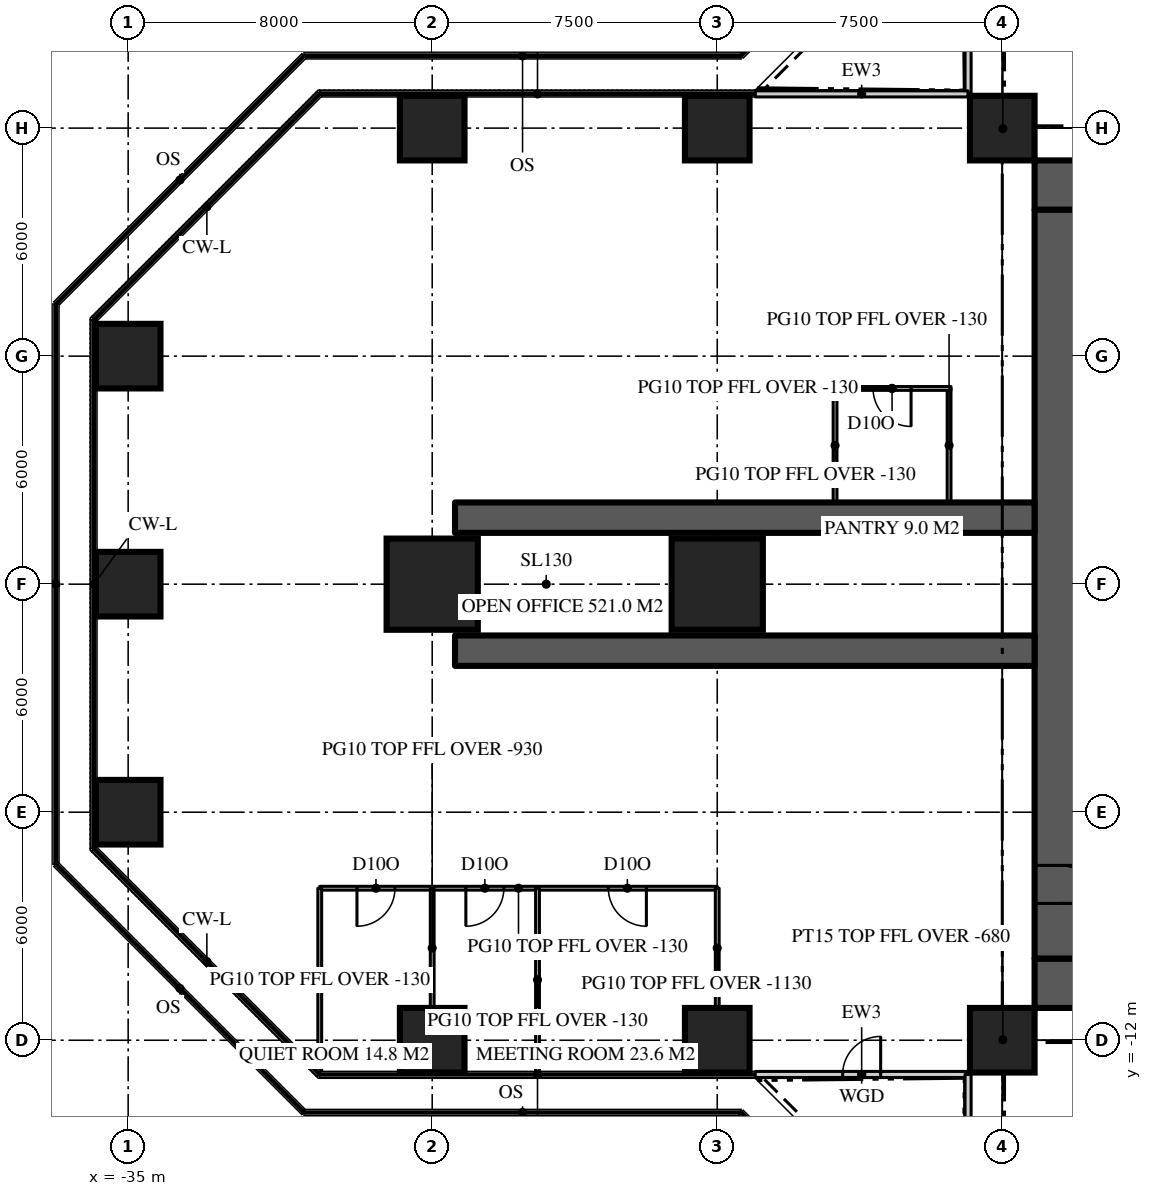
"""IFC4 building model, lengths in metres.
Left out: names, types, materials, properties, quantities, classifications, styles, units other than length and angle.
Written with IfcOpenShell. Run it as: python <this file> out.ifc"""

import sys

from ifc_helpers import new_model, si_unit, direction, frame, frame_2d, origin, origin_2d, place, context, subcontext, project, spatial, rectangle, extrude, element, fill, save


model = new_model("IFC4")
c1 = context("Model", 3, precision=1e-05, world=origin(), true_north=direction((0.0, 1.0)))
c2 = subcontext(c1, "Body", "Model", "MODEL_VIEW")
j1 = project(units=[si_unit("LENGTHUNIT", "METRE"), si_unit("PLANEANGLEUNIT", "RADIAN")], contexts=[c1])
p1 = place(None, origin())
s1 = spatial("IfcSite", under=j1, at=p1, CompositionType="ELEMENT")
p2 = place(p1, origin())
s2 = spatial("IfcBuilding", under=s1, at=p2, CompositionType="ELEMENT")
p3 = place(p2, frame((0.0, 0.0, 74.7)))
s3 = spatial("IfcBuildingStorey", under=s2, at=p3, CompositionType="ELEMENT", Elevation=74.7)
p4 = place(p3, frame((-11.15, 10.5, 0.0), z_axis=(0.0, 0.0, 1.0), x_axis=(1.0, 0.0, 0.0)))
e1 = element("IfcWall", 1, at=p4, inside=s3, PredefinedType="SHEAR", context=c2, shape_type="SweptSolid", body=[
    extrude(rectangle(XDim=22.3, YDim=1.3, at=frame_2d((11.15, 0.0))), origin(), (0.0, 0.0, 1.0), 3.9),
])
p5 = place(p4, frame((4.25, 0.0, 0.0)))
e2 = element("IfcOpeningElement", 2, at=p5, cuts=e1, PredefinedType="OPENING", context=c2, shape_type="SweptSolid", body=[
    extrude(rectangle(XDim=1.8, YDim=2.2, at=frame_2d((0.9, 1.1))), frame((0.0, 0.66, 0.0), z_axis=(0.0, -1.0, 0.0), x_axis=(1.0, 0.0, 0.0)), (0.0, 0.0, 1.0), 1.32),
])
p6 = place(p4, frame((16.25, 0.0, 0.0)))
e3 = element("IfcOpeningElement", 3, at=p6, cuts=e1, PredefinedType="OPENING", context=c2, shape_type="SweptSolid", body=[
    extrude(rectangle(XDim=1.8, YDim=2.2, at=frame_2d((0.9, 1.1))), frame((0.0, 0.66, 0.0), z_axis=(0.0, -1.0, 0.0), x_axis=(1.0, 0.0, 0.0)), (0.0, 0.0, 1.0), 1.32),
])
p7 = place(p3, frame((11.15, -10.5, 0.0), z_axis=(0.0, 0.0, 1.0), x_axis=(-1.0, 0.0, 0.0)))
e4 = element("IfcWall", 4, at=p7, inside=s3, PredefinedType="SHEAR", context=c2, shape_type="SweptSolid", body=[
    extrude(rectangle(XDim=22.3, YDim=1.3, at=frame_2d((11.15, 0.0))), origin(), (0.0, 0.0, 1.0), 3.9),
])
p8 = place(p7, frame((16.25, 0.0, 0.0)))
e5 = element("IfcOpeningElement", 5, at=p8, cuts=e4, PredefinedType="OPENING", context=c2, shape_type="SweptSolid", body=[
    extrude(rectangle(XDim=1.8, YDim=2.2, at=frame_2d((0.9, 1.1))), frame((0.0, 0.66, 0.0), z_axis=(0.0, -1.0, 0.0), x_axis=(1.0, 0.0, 0.0)), (0.0, 0.0, 1.0), 1.32),
])
p9 = place(p7, frame((4.25, 0.0, 0.0)))
e6 = element("IfcOpeningElement", 6, at=p9, cuts=e4, PredefinedType="OPENING", context=c2, shape_type="SweptSolid", body=[
    extrude(rectangle(XDim=1.8, YDim=2.2, at=frame_2d((0.9, 1.1))), frame((0.0, 0.66, 0.0), z_axis=(0.0, -1.0, 0.0), x_axis=(1.0, 0.0, 0.0)), (0.0, 0.0, 1.0), 1.32),
])
p10 = place(p3, frame((-10.5, 9.85, 0.0), z_axis=(0.0, 0.0, 1.0), x_axis=(0.0, -1.0, 0.0)))
e7 = element("IfcWall", 7, at=p10, inside=s3, PredefinedType="SHEAR", context=c2, shape_type="SweptSolid", body=[
    extrude(rectangle(XDim=19.7, YDim=1.3, at=frame_2d((9.85, 0.0))), origin(), (0.0, 0.0, 1.0), 3.9),
])
p11 = place(p10, frame((17.25, 0.0, 0.0)))
e8 = element("IfcOpeningElement", 8, at=p11, cuts=e7, PredefinedType="OPENING", context=c2, shape_type="SweptSolid", body=[
    extrude(rectangle(XDim=1.0, YDim=2.2, at=frame_2d((0.5, 1.1))), frame((0.0, 0.66, 0.0), z_axis=(0.0, -1.0, 0.0), x_axis=(1.0, 0.0, 0.0)), (0.0, 0.0, 1.0), 1.32),
])
for number, where, z_axis, x_axis in (
    (9, (-11.15, 1.75, 0.0), (0.0, 0.0, 1.0), (-1.0, 0.0, 0.0)),
    (10, (-11.15, -1.75, 0.0), (0.0, 0.0, 1.0), (-1.0, 0.0, 0.0)),
):
    element("IfcWall", number, at=place(p3, frame(where, z_axis=z_axis, x_axis=x_axis)), inside=s3, PredefinedType="SHEAR", context=c2, shape_type="SweptSolid", body=[
        extrude(rectangle(XDim=15.25, YDim=0.8, at=frame_2d((7.625, 0.0))), origin(), (0.0, 0.0, 1.0), 3.9),
    ])
for number, where, z_axis, x_axis in (
    (11, (-27.0, -12.0, 0.0), (0.0, 0.0, 1.0), (1.0, 0.0, 0.0)),
    (12, (-19.5, -12.0, 0.0), (0.0, 0.0, 1.0), (1.0, 0.0, 0.0)),
    (13, (-12.0, -12.0, 0.0), (0.0, 0.0, 1.0), (1.0, 0.0, 0.0)),
    (14, (-35.0, -6.0, 0.0), (0.0, 0.0, 1.0), (1.0, 0.0, 0.0)),
    (15, (-35.0, 0.0, 0.0), (0.0, 0.0, 1.0), (1.0, 0.0, 0.0)),
):
    element("IfcColumn", number, at=place(p3, frame(where, z_axis=z_axis, x_axis=x_axis)), inside=s3, PredefinedType="COLUMN", context=c2, shape_type="SweptSolid", body=[
        extrude(rectangle(XDim=1.7, YDim=1.7, at=origin_2d()), origin(), (0.0, 0.0, 1.0), 3.9),
    ])
for number, where, z_axis, x_axis in (
    (16, (-27.0, 0.0, 0.0), (0.0, 0.0, 1.0), (1.0, 0.0, 0.0)),
    (17, (-19.5, 0.0, 0.0), (0.0, 0.0, 1.0), (1.0, 0.0, 0.0)),
):
    element("IfcColumn", number, at=place(p3, frame(where, z_axis=z_axis, x_axis=x_axis)), inside=s3, PredefinedType="COLUMN", context=c2, shape_type="SweptSolid", body=[
        extrude(rectangle(XDim=2.4, YDim=2.4, at=origin_2d()), origin(), (0.0, 0.0, 1.0), 3.9),
    ])
for number, where, z_axis, x_axis in (
    (18, (-35.0, 6.0, 0.0), (0.0, 0.0, 1.0), (1.0, 0.0, 0.0)),
    (19, (-27.0, 12.0, 0.0), (0.0, 0.0, 1.0), (1.0, 0.0, 0.0)),
    (20, (-19.5, 12.0, 0.0), (0.0, 0.0, 1.0), (1.0, 0.0, 0.0)),
    (21, (-12.0, 12.0, 0.0), (0.0, 0.0, 1.0), (1.0, 0.0, 0.0)),
):
    element("IfcColumn", number, at=place(p3, frame(where, z_axis=z_axis, x_axis=x_axis)), inside=s3, PredefinedType="COLUMN", context=c2, shape_type="SweptSolid", body=[
        extrude(rectangle(XDim=1.7, YDim=1.7, at=origin_2d()), origin(), (0.0, 0.0, 1.0), 3.9),
    ])
p12 = place(p3, frame((-12.9, 18.5, 0.0), z_axis=(0.0, 0.0, 1.0), x_axis=(0.0, -1.0, 0.0)))
e22 = element("IfcWall", 22, at=p12, inside=s3, PredefinedType="SOLIDWALL", context=c2, shape_type="SweptSolid", body=[
    extrude(rectangle(XDim=5.6, YDim=0.16, at=frame_2d((2.8, 0.0))), origin(), (0.0, 0.0, 1.0), 3.77),
])
p13 = place(p12, frame((2.3, 0.0, 0.0)))
e23 = element("IfcOpeningElement", 23, at=p13, cuts=e22, PredefinedType="OPENING", context=c2, shape_type="SweptSolid", body=[
    extrude(rectangle(XDim=1.0, YDim=2.2, at=frame_2d((0.5, 1.1))), frame((0.0, 0.09, 0.0), z_axis=(0.0, -1.0, 0.0), x_axis=(1.0, 0.0, 0.0)), (0.0, 0.0, 1.0), 0.18),
])
p14 = place(p3, frame((-12.9, 12.9, 0.0), z_axis=(0.0, 0.0, 1.0), x_axis=(-1.0, 0.0, 0.0)))
e24 = element("IfcWall", 24, at=p14, inside=s3, PredefinedType="SOLIDWALL", context=c2, shape_type="SweptSolid", body=[
    extrude(rectangle(XDim=5.6, YDim=0.16, at=frame_2d((2.8, 0.0))), origin(), (0.0, 0.0, 1.0), 3.77),
])
p15 = place(p3, frame((-18.5, -12.9, 0.0), z_axis=(0.0, 0.0, 1.0), x_axis=(1.0, 0.0, 0.0)))
e25 = element("IfcWall", 25, at=p15, inside=s3, PredefinedType="SOLIDWALL", context=c2, shape_type="SweptSolid", body=[
    extrude(rectangle(XDim=5.6, YDim=0.16, at=frame_2d((2.8, 0.0))), origin(), (0.0, 0.0, 1.0), 3.77),
])
p16 = place(p15, frame((2.3, 0.0, 0.0)))
e26 = element("IfcOpeningElement", 26, at=p16, cuts=e25, PredefinedType="OPENING", context=c2, shape_type="SweptSolid", body=[
    extrude(rectangle(XDim=1.0, YDim=2.2, at=frame_2d((0.5, 1.1))), frame((0.0, 0.09, 0.0), z_axis=(0.0, -1.0, 0.0), x_axis=(1.0, 0.0, 0.0)), (0.0, 0.0, 1.0), 0.18),
])
p17 = place(p3, frame((-12.9, -12.9, 0.0), z_axis=(0.0, 0.0, 1.0), x_axis=(0.0, -1.0, 0.0)))
e27 = element("IfcWall", 27, at=p17, inside=s3, PredefinedType="SOLIDWALL", context=c2, shape_type="SweptSolid", body=[
    extrude(rectangle(XDim=5.6, YDim=0.16, at=frame_2d((2.8, 0.0))), origin(), (0.0, 0.0, 1.0), 3.77),
])
p18 = place(p3, frame((-19.5, -8.0, 0.0), z_axis=(0.0, 0.0, 1.0), x_axis=(-1.0, 0.0, 0.0)))
e28 = element("IfcWall", 28, at=p18, inside=s3, PredefinedType="PARTITIONING", context=c2, shape_type="SweptSolid", body=[
    extrude(rectangle(XDim=10.459, YDim=0.1, at=frame_2d((5.229, 0.0))), origin(), (0.0, 0.0, 1.0), 3.77),
])
p19 = place(p18, frame((1.865, 0.0, 0.0)))
e29 = element("IfcOpeningElement", 29, at=p19, cuts=e28, PredefinedType="OPENING", context=c2, shape_type="SweptSolid", body=[
    extrude(rectangle(XDim=1.0, YDim=2.2, at=frame_2d((0.5, 1.1))), frame((0.0, 0.06, 0.0), z_axis=(0.0, -1.0, 0.0), x_axis=(1.0, 0.0, 0.0)), (0.0, 0.0, 1.0), 0.12),
])
p20 = place(p18, frame((5.615, 0.0, 0.0)))
e30 = element("IfcOpeningElement", 30, at=p20, cuts=e28, PredefinedType="OPENING", context=c2, shape_type="SweptSolid", body=[
    extrude(rectangle(XDim=1.0, YDim=2.2, at=frame_2d((0.5, 1.1))), frame((0.0, 0.06, 0.0), z_axis=(0.0, -1.0, 0.0), x_axis=(1.0, 0.0, 0.0)), (0.0, 0.0, 1.0), 0.12),
])
p21 = place(p18, frame((8.479, 0.0, 0.0)))
e31 = element("IfcOpeningElement", 31, at=p21, cuts=e28, PredefinedType="OPENING", context=c2, shape_type="SweptSolid", body=[
    extrude(rectangle(XDim=1.0, YDim=2.2, at=frame_2d((0.5, 1.1))), frame((0.0, 0.06, 0.0), z_axis=(0.0, -1.0, 0.0), x_axis=(1.0, 0.0, 0.0)), (0.0, 0.0, 1.0), 0.12),
])
p22 = place(p3, frame((-19.5, -8.0, 0.0), z_axis=(0.0, 0.0, 1.0), x_axis=(0.0, -1.0, 0.0)))
e32 = element("IfcWall", 32, at=p22, inside=s3, PredefinedType="PARTITIONING", context=c2, shape_type="SweptSolid", body=[
    extrude(rectangle(XDim=3.15, YDim=0.1, at=frame_2d((1.575, 0.0))), origin(), (0.0, 0.0, 1.0), 2.77),
])
p23 = place(p3, frame((-24.229, -8.0, 0.0), z_axis=(0.0, 0.0, 1.0), x_axis=(0.0, -1.0, 0.0)))
e33 = element("IfcWall", 33, at=p23, inside=s3, PredefinedType="PARTITIONING", context=c2, shape_type="SweptSolid", body=[
    extrude(rectangle(XDim=4.82, YDim=0.1, at=frame_2d((2.41, 0.0))), origin(), (0.0, 0.0, 1.0), 3.77),
])
p24 = place(p3, frame((-27.0, -8.0, 0.0), z_axis=(0.0, 0.0, 1.0), x_axis=(0.0, -1.0, 0.0)))
e34 = element("IfcWall", 34, at=p24, inside=s3, PredefinedType="PARTITIONING", context=c2, shape_type="SweptSolid", body=[
    extrude(rectangle(XDim=3.15, YDim=0.1, at=frame_2d((1.575, 0.0))), origin(), (0.0, 0.0, 1.0), 2.97),
])
p25 = place(p3, frame((-29.959, -8.0, 0.0), z_axis=(0.0, 0.0, 1.0), x_axis=(0.0, -1.0, 0.0)))
e35 = element("IfcWall", 35, at=p25, inside=s3, PredefinedType="PARTITIONING", context=c2, shape_type="SweptSolid", body=[
    extrude(rectangle(XDim=4.82, YDim=0.1, at=frame_2d((2.41, 0.0))), origin(), (0.0, 0.0, 1.0), 3.77),
])
for number, where, z_axis, x_axis in (
    (36, (-13.4, 2.15, 0.0), (0.0, 0.0, 1.0), (0.0, 1.0, 0.0)),
    (37, (-16.4, 2.15, 0.0), (0.0, 0.0, 1.0), (0.0, 1.0, 0.0)),
):
    element("IfcWall", number, at=place(p3, frame(where, z_axis=z_axis, x_axis=x_axis)), inside=s3, PredefinedType="PARTITIONING", context=c2, shape_type="SweptSolid", body=[
        extrude(rectangle(XDim=3.0, YDim=0.1, at=frame_2d((1.5, 0.0))), origin(), (0.0, 0.0, 1.0), 3.77),
    ])
p26 = place(p3, frame((-13.35, 5.15, 0.0), z_axis=(0.0, 0.0, 1.0), x_axis=(-1.0, 0.0, 0.0)))
e38 = element("IfcWall", 38, at=p26, inside=s3, PredefinedType="PARTITIONING", context=c2, shape_type="SweptSolid", body=[
    extrude(rectangle(XDim=3.1, YDim=0.1, at=frame_2d((1.55, 0.0))), origin(), (0.0, 0.0, 1.0), 3.77),
])
p27 = place(p26, frame((1.05, 0.0, 0.0)))
e39 = element("IfcOpeningElement", 39, at=p27, cuts=e38, PredefinedType="OPENING", context=c2, shape_type="SweptSolid", body=[
    extrude(rectangle(XDim=1.0, YDim=2.2, at=frame_2d((0.5, 1.1))), frame((0.0, 0.06, 0.0), z_axis=(0.0, -1.0, 0.0), x_axis=(1.0, 0.0, 0.0)), (0.0, 0.0, 1.0), 0.12),
])
for number, where, z_axis, x_axis in (
    (40, (-11.15, 11.15, 0.0), (0.0, 0.0, 1.0), (-0.707, 0.707, 0.0)),
    (41, (-11.15, -11.15, 0.0), (0.0, 0.0, 1.0), (-0.707, -0.707, 0.0)),
):
    element("IfcWall", number, at=place(p3, frame(where, z_axis=z_axis, x_axis=x_axis)), inside=s3, PredefinedType="PARTITIONING", context=c2, shape_type="SweptSolid", body=[
        extrude(rectangle(XDim=2.362, YDim=0.15, at=frame_2d((1.181, 0.0))), origin(), (0.0, 0.0, 1.0), 3.22),
    ])
p28 = place(p16, origin())
e42 = element("IfcDoor", 42, at=p28, inside=s3, OperationType="SINGLE_SWING_RIGHT", PredefinedType="DOOR", context=c2, shape_type="SweptSolid", body=[
    extrude(rectangle(XDim=1.0, YDim=2.2, at=frame_2d((0.5, 1.1))), frame((0.0, 0.025, 0.0), z_axis=(0.0, -1.0, 0.0), x_axis=(1.0, 0.0, 0.0)), (0.0, 0.0, 1.0), 0.05),
])
fill(e26, e42)
p29 = place(p11, origin())
e43 = element("IfcDoor", 43, at=p29, inside=s3, OperationType="SINGLE_SWING_RIGHT", PredefinedType="DOOR", context=c2, shape_type="SweptSolid", body=[
    extrude(rectangle(XDim=1.0, YDim=2.2, at=frame_2d((0.5, 1.1))), frame((0.0, 0.025, 0.0), z_axis=(0.0, -1.0, 0.0), x_axis=(1.0, 0.0, 0.0)), (0.0, 0.0, 1.0), 0.05),
])
fill(e8, e43)
p30 = place(p19, origin())
e44 = element("IfcDoor", 44, at=p30, inside=s3, OperationType="SINGLE_SWING_LEFT", PredefinedType="DOOR", context=c2, shape_type="SweptSolid", body=[
    extrude(rectangle(XDim=1.0, YDim=2.2, at=frame_2d((0.5, 1.1))), frame((0.0, 0.025, 0.0), z_axis=(0.0, -1.0, 0.0), x_axis=(1.0, 0.0, 0.0)), (0.0, 0.0, 1.0), 0.05),
])
fill(e29, e44)
p31 = place(p20, origin())
e45 = element("IfcDoor", 45, at=p31, inside=s3, OperationType="SINGLE_SWING_RIGHT", PredefinedType="DOOR", context=c2, shape_type="SweptSolid", body=[
    extrude(rectangle(XDim=1.0, YDim=2.2, at=frame_2d((0.5, 1.1))), frame((0.0, 0.025, 0.0), z_axis=(0.0, -1.0, 0.0), x_axis=(1.0, 0.0, 0.0)), (0.0, 0.0, 1.0), 0.05),
])
fill(e30, e45)
p32 = place(p21, origin())
e46 = element("IfcDoor", 46, at=p32, inside=s3, OperationType="SINGLE_SWING_RIGHT", PredefinedType="DOOR", context=c2, shape_type="SweptSolid", body=[
    extrude(rectangle(XDim=1.0, YDim=2.2, at=frame_2d((0.5, 1.1))), frame((0.0, 0.025, 0.0), z_axis=(0.0, -1.0, 0.0), x_axis=(1.0, 0.0, 0.0)), (0.0, 0.0, 1.0), 0.05),
])
fill(e31, e46)
p33 = place(p27, origin())
e47 = element("IfcDoor", 47, at=p33, inside=s3, OperationType="SINGLE_SWING_LEFT", PredefinedType="DOOR", context=c2, shape_type="SweptSolid", body=[
    extrude(rectangle(XDim=1.0, YDim=2.2, at=frame_2d((0.5, 1.1))), frame((0.0, 0.025, 0.0), z_axis=(0.0, -1.0, 0.0), x_axis=(1.0, 0.0, 0.0)), (0.0, 0.0, 1.0), 0.05),
])
fill(e39, e47)
save(model, sys.argv[1])
